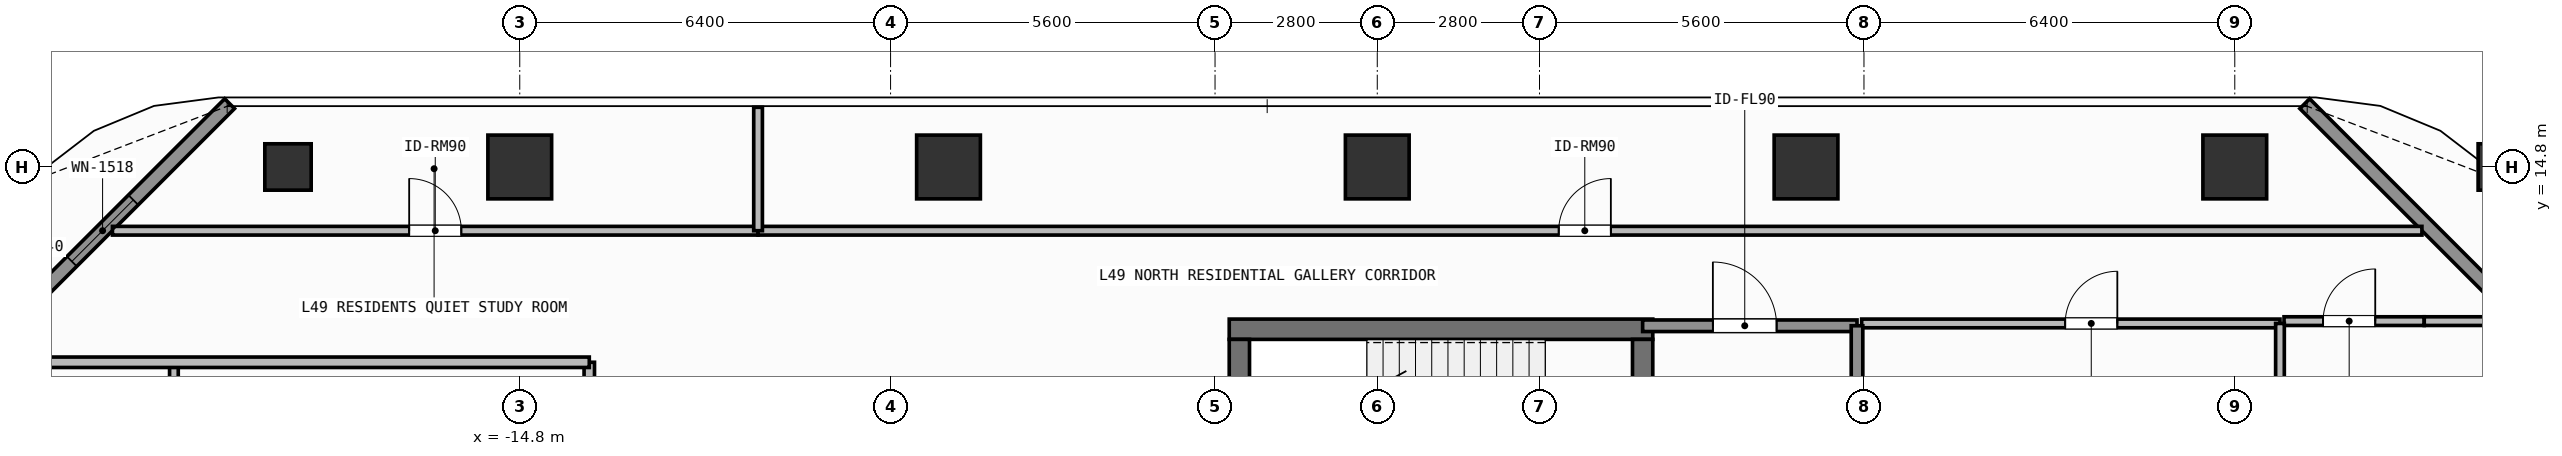
"""IFC4 building model, lengths in metres.
Left out: names, types, materials, properties, quantities, classifications, styles, units other than length and angle.
Written with IfcOpenShell. Run it as: python <this file> out.ifc"""

import sys

from ifc_helpers import new_model, si_unit, direction, frame, frame_2d, origin, origin_2d, place, context, subcontext, project, spatial, rectangle, hollow_rectangle, extrude, element, fill, save


model = new_model("IFC4")
c1 = context("Model", 3, precision=1e-05, world=origin(), true_north=direction((0.0, 1.0)))
c2 = subcontext(c1, "Body", "Model", "MODEL_VIEW")
j1 = project(units=[si_unit("LENGTHUNIT", "METRE"), si_unit("PLANEANGLEUNIT", "RADIAN")], contexts=[c1])
p1 = place(None, origin())
s1 = spatial("IfcSite", under=j1, at=p1, CompositionType="ELEMENT")
p2 = place(p1, origin())
s2 = spatial("IfcBuilding", under=s1, at=p2, CompositionType="ELEMENT")
p3 = place(p2, frame((0.0, 0.0, 199.2)))
s3 = spatial("IfcBuildingStorey", under=s2, at=p3, CompositionType="ELEMENT", Elevation=199.2)
p4 = place(p3, frame((-2.555, 12.0, 0.0), z_axis=(0.0, 0.0, 1.0), x_axis=(1.0, 0.0, 0.0)))
e1 = element("IfcWall", 1, at=p4, inside=s3, PredefinedType="SHEAR", context=c2, shape_type="SweptSolid", body=[
    extrude(rectangle(XDim=7.31, YDim=0.35, at=frame_2d((3.655, 0.0))), origin(), (0.0, 0.0, 1.0), 3.9),
])
p5 = place(p3, frame((-2.38, 8.9, 0.0), z_axis=(0.0, 0.0, 1.0), x_axis=(0.0, 1.0, 0.0)))
e2 = element("IfcWall", 2, at=p5, inside=s3, PredefinedType="SHEAR", context=c2, shape_type="SweptSolid", body=[
    extrude(rectangle(XDim=2.925, YDim=0.35, at=frame_2d((1.462, 0.0))), origin(), (0.0, 0.0, 1.0), 3.9),
])
p6 = place(p3, frame((4.58, 11.825, 0.0), z_axis=(0.0, 0.0, 1.0), x_axis=(0.0, -1.0, 0.0)))
e3 = element("IfcWall", 3, at=p6, inside=s3, PredefinedType="SHEAR", context=c2, shape_type="SweptSolid", body=[
    extrude(rectangle(XDim=2.925, YDim=0.35, at=frame_2d((1.462, 0.0))), origin(), (0.0, 0.0, 1.0), 3.9),
])
p7 = place(p6, frame((0.913, 0.0, 0.0)))
e4 = element("IfcOpeningElement", 4, at=p7, cuts=e3, PredefinedType="OPENING", context=c2, shape_type="SweptSolid", body=[
    extrude(rectangle(XDim=1.1, YDim=2.15, at=frame_2d((0.55, 1.075))), frame((0.0, 0.185, 0.0), z_axis=(0.0, -1.0, 0.0), x_axis=(1.0, 0.0, 0.0)), (0.0, 0.0, 1.0), 0.37),
])
for number, where, z_axis, x_axis in (
    (5, (-14.8, 14.8, 0.0), (0.0, 0.0, 1.0), (1.0, 0.0, 0.0)),
    (6, (-7.4, 14.8, 0.0), (0.0, 0.0, 1.0), (1.0, 0.0, 0.0)),
    (7, (0.0, 14.8, 0.0), (0.0, 0.0, 1.0), (1.0, 0.0, 0.0)),
    (8, (7.4, 14.8, 0.0), (0.0, 0.0, 1.0), (1.0, 0.0, 0.0)),
    (9, (14.8, 14.8, 0.0), (0.0, 0.0, 1.0), (1.0, 0.0, 0.0)),
):
    element("IfcColumn", number, at=place(p3, frame(where, z_axis=z_axis, x_axis=x_axis)), inside=s3, PredefinedType="COLUMN", context=c2, shape_type="SweptSolid", body=[
        extrude(rectangle(XDim=1.1, YDim=1.1, at=origin_2d()), origin(), (0.0, 0.0, 1.0), 3.9),
    ])
for number, where, z_axis, x_axis in (
    (10, (-18.8, 14.8, 0.0), (0.0, 0.0, 1.0), (1.0, 0.0, 0.0)),
    (11, (19.4, 14.8, 0.0), (0.0, 0.0, 1.0), (1.0, 0.0, 0.0)),
):
    element("IfcColumn", number, at=place(p3, frame(where, z_axis=z_axis, x_axis=x_axis)), inside=s3, PredefinedType="COLUMN", context=c2, shape_type="SweptSolid", body=[
        extrude(hollow_rectangle(XDim=0.8, YDim=0.8, WallThickness=0.036, at=origin_2d()), origin(), (0.0, 0.0, 1.0), 3.9),
    ])
p8 = place(p3, frame((-24.192, 11.508, 0.0), z_axis=(0.0, 0.0, 1.0), x_axis=(0.707106781187, 0.707106781187, 0.0)))
e12 = element("IfcWall", 12, at=p8, inside=s3, PredefinedType="SOLIDWALL", context=c2, shape_type="SweptSolid", body=[
    extrude(rectangle(XDim=6.201, YDim=0.24, at=frame_2d((3.101, 0.0))), origin(), (0.0, 0.0, 1.0), 3.68),
])
p9 = place(p8, frame((2.351, 0.0, 0.8)))
e13 = element("IfcOpeningElement", 13, at=p9, cuts=e12, PredefinedType="OPENING", context=c2, shape_type="SweptSolid", body=[
    extrude(rectangle(XDim=1.5, YDim=1.85, at=frame_2d((0.75, 0.925))), frame((0.0, 0.13, 0.0), z_axis=(0.0, -1.0, 0.0), x_axis=(1.0, 0.0, 0.0)), (0.0, 0.0, 1.0), 0.26),
])
p10 = place(p3, frame((16.008, 15.892, 0.0), z_axis=(0.0, 0.0, 1.0), x_axis=(0.707106781187, -0.707106781187, 0.0)))
e14 = element("IfcWall", 14, at=p10, inside=s3, PredefinedType="SOLIDWALL", context=c2, shape_type="SweptSolid", body=[
    extrude(rectangle(XDim=6.201, YDim=0.24, at=frame_2d((3.101, 0.0))), origin(), (0.0, 0.0, 1.0), 3.68),
])
p11 = place(p3, frame((4.58, 12.06, 0.0), z_axis=(0.0, 0.0, 1.0), x_axis=(1.0, 0.0, 0.0)))
e15 = element("IfcWall", 15, at=p11, inside=s3, PredefinedType="SOLIDWALL", context=c2, shape_type="SweptSolid", body=[
    extrude(rectangle(XDim=3.7, YDim=0.2, at=frame_2d((1.85, 0.0))), origin(), (0.0, 0.0, 1.0), 3.68),
])
p12 = place(p11, frame((1.212, 0.0, 0.0)))
e16 = element("IfcOpeningElement", 16, at=p12, cuts=e15, PredefinedType="OPENING", context=c2, shape_type="SweptSolid", body=[
    extrude(rectangle(XDim=1.1, YDim=2.15, at=frame_2d((0.55, 1.075))), frame((0.0, 0.11, 0.0), z_axis=(0.0, -1.0, 0.0), x_axis=(1.0, 0.0, 0.0)), (0.0, 0.0, 1.0), 0.22),
])
p13 = place(p3, frame((8.36, 12.1, 0.0), z_axis=(0.0, 0.0, 1.0), x_axis=(1.0, 0.0, 0.0)))
e17 = element("IfcWall", 17, at=p13, inside=s3, PredefinedType="PARTITIONING", context=c2, shape_type="SweptSolid", body=[
    extrude(rectangle(XDim=7.22, YDim=0.15, at=frame_2d((3.61, 0.0))), origin(), (0.0, 0.0, 1.0), 3.68),
])
p14 = place(p13, frame((3.513, 0.0, 0.0)))
e18 = element("IfcOpeningElement", 18, at=p14, cuts=e17, PredefinedType="OPENING", context=c2, shape_type="SweptSolid", body=[
    extrude(rectangle(XDim=0.9, YDim=2.1, at=frame_2d((0.45, 1.05))), frame((0.0, 0.085, 0.0), z_axis=(0.0, -1.0, 0.0), x_axis=(1.0, 0.0, 0.0)), (0.0, 0.0, 1.0), 0.17),
])
p15 = place(p3, frame((-21.83, 13.7, 0.0), z_axis=(0.0, 0.0, 1.0), x_axis=(1.0, 0.0, 0.0)))
e19 = element("IfcWall", 19, at=p15, inside=s3, PredefinedType="PARTITIONING", context=c2, shape_type="SweptSolid", body=[
    extrude(rectangle(XDim=11.143, YDim=0.15, at=frame_2d((5.572, 0.0))), origin(), (0.0, 0.0, 1.0), 3.68),
])
p16 = place(p15, frame((5.122, 0.0, 0.0)))
e20 = element("IfcOpeningElement", 20, at=p16, cuts=e19, PredefinedType="OPENING", context=c2, shape_type="SweptSolid", body=[
    extrude(rectangle(XDim=0.9, YDim=2.1, at=frame_2d((0.45, 1.05))), frame((0.0, 0.085, 0.0), z_axis=(0.0, -1.0, 0.0), x_axis=(1.0, 0.0, 0.0)), (0.0, 0.0, 1.0), 0.17),
])
p17 = place(p3, frame((-10.687, 13.7, 0.0), z_axis=(0.0, 0.0, 1.0), x_axis=(1.0, 0.0, 0.0)))
e21 = element("IfcWall", 21, at=p17, inside=s3, PredefinedType="PARTITIONING", context=c2, shape_type="SweptSolid", body=[
    extrude(rectangle(XDim=28.717, YDim=0.15, at=frame_2d((14.358, 0.0))), origin(), (0.0, 0.0, 1.0), 3.68),
])
p18 = place(p17, frame((13.819, 0.0, 0.0)))
e22 = element("IfcOpeningElement", 22, at=p18, cuts=e21, PredefinedType="OPENING", context=c2, shape_type="SweptSolid", body=[
    extrude(rectangle(XDim=0.9, YDim=2.1, at=frame_2d((0.45, 1.05))), frame((0.0, 0.085, 0.0), z_axis=(0.0, -1.0, 0.0), x_axis=(1.0, 0.0, 0.0)), (0.0, 0.0, 1.0), 0.17),
])
p19 = place(p3, frame((-13.6, 0.644, 0.0), z_axis=(0.0, 0.0, 1.0), x_axis=(0.0, 1.0, 0.0)))
e23 = element("IfcWall", 23, at=p19, inside=s3, PredefinedType="PARTITIONING", context=c2, shape_type="SweptSolid", body=[
    extrude(rectangle(XDim=10.786, YDim=0.18, at=frame_2d((5.393, 0.0))), origin(), (0.0, 0.0, 1.0), 3.68),
])
p20 = place(p19, frame((4.982, 0.0, 0.0)))
e24 = element("IfcOpeningElement", 24, at=p20, cuts=e23, PredefinedType="OPENING", context=c2, shape_type="SweptSolid", body=[
    extrude(rectangle(XDim=1.0, YDim=2.2, at=frame_2d((0.5, 1.1))), frame((0.0, 0.1, 0.0), z_axis=(0.0, -1.0, 0.0), x_axis=(1.0, 0.0, 0.0)), (0.0, 0.0, 1.0), 0.2),
])
p21 = place(p3, frame((15.65, 12.14, 0.0), z_axis=(0.0, 0.0, 1.0), x_axis=(1.0, 0.0, 0.0)))
e25 = element("IfcWall", 25, at=p21, inside=s3, PredefinedType="PARTITIONING", context=c2, shape_type="SweptSolid", body=[
    extrude(rectangle(XDim=2.42, YDim=0.15, at=frame_2d((1.21, 0.0))), origin(), (0.0, 0.0, 1.0), 3.68),
])
p22 = place(p21, frame((0.674, 0.0, 0.0)))
e26 = element("IfcOpeningElement", 26, at=p22, cuts=e25, PredefinedType="OPENING", context=c2, shape_type="SweptSolid", body=[
    extrude(rectangle(XDim=0.9, YDim=2.1, at=frame_2d((0.45, 1.05))), frame((0.0, 0.085, 0.0), z_axis=(0.0, -1.0, 0.0), x_axis=(1.0, 0.0, 0.0)), (0.0, 0.0, 1.0), 0.17),
])
p23 = place(p3, frame((8.28, 8.8, 0.0), z_axis=(0.0, 0.0, 1.0), x_axis=(0.0, 1.0, 0.0)))
e27 = element("IfcWall", 27, at=p23, inside=s3, PredefinedType="SOLIDWALL", context=c2, shape_type="SweptSolid", body=[
    extrude(rectangle(XDim=3.26, YDim=0.2, at=frame_2d((1.63, 0.0))), origin(), (0.0, 0.0, 1.0), 3.68),
])
p24 = place(p3, frame((15.58, 5.85, 0.0), z_axis=(0.0, 0.0, 1.0), x_axis=(0.0, 1.0, 0.0)))
e28 = element("IfcWall", 28, at=p24, inside=s3, PredefinedType="PARTITIONING", context=c2, shape_type="SweptSolid", body=[
    extrude(rectangle(XDim=6.25, YDim=0.15, at=frame_2d((3.125, 0.0))), origin(), (0.0, 0.0, 1.0), 3.68),
])
p25 = place(p3, frame((-10.687, 13.7, 0.0), z_axis=(0.0, 0.0, 1.0), x_axis=(0.0, 1.0, 0.0)))
e29 = element("IfcWall", 29, at=p25, inside=s3, PredefinedType="PARTITIONING", context=c2, shape_type="SweptSolid", body=[
    extrude(rectangle(XDim=2.13, YDim=0.15, at=frame_2d((1.065, 0.0))), origin(), (0.0, 0.0, 1.0), 3.68),
])
p26 = place(p3, frame((-20.769, 8.146, 0.0), z_axis=(0.0, 0.0, 1.0), x_axis=(0.0, 1.0, 0.0)))
e30 = element("IfcWall", 30, at=p26, inside=s3, PredefinedType="PARTITIONING", context=c2, shape_type="SweptSolid", body=[
    extrude(rectangle(XDim=3.284, YDim=0.15, at=frame_2d((1.642, 0.0))), origin(), (0.0, 0.0, 1.0), 3.68),
])
p27 = place(p3, frame((-24.13, 11.43, 0.0), z_axis=(0.0, 0.0, 1.0), x_axis=(1.0, 0.0, 0.0)))
e31 = element("IfcWall", 31, at=p27, inside=s3, PredefinedType="PARTITIONING", context=c2, shape_type="SweptSolid", body=[
    extrude(rectangle(XDim=10.53, YDim=0.18, at=frame_2d((5.265, 0.0))), origin(), (0.0, 0.0, 1.0), 3.42),
])
p28 = place(p3, frame((18.07, 12.14, 0.0), z_axis=(0.0, 0.0, 1.0), x_axis=(1.0, 0.0, 0.0)))
e32 = element("IfcWall", 32, at=p28, inside=s3, PredefinedType="PARTITIONING", context=c2, shape_type="SweptSolid", body=[
    extrude(rectangle(XDim=1.52, YDim=0.15, at=frame_2d((0.76, 0.0))), origin(), (0.0, 0.0, 1.0), 3.68),
])
p29 = place(p9, origin())
e33 = element("IfcWindow", 33, at=p29, inside=s3, PartitioningType="SINGLE_PANEL", PredefinedType="WINDOW", context=c2, shape_type="SweptSolid", body=[
    extrude(rectangle(XDim=1.5, YDim=1.85, at=frame_2d((0.75, 0.925))), frame((0.0, 0.03, 0.0), z_axis=(0.0, -1.0, 0.0), x_axis=(1.0, 0.0, 0.0)), (0.0, 0.0, 1.0), 0.06),
])
fill(e13, e33)
p30 = place(p12, origin())
e34 = element("IfcDoor", 34, at=p30, inside=s3, OperationType="SINGLE_SWING_LEFT", PredefinedType="DOOR", context=c2, shape_type="SweptSolid", body=[
    extrude(rectangle(XDim=1.1, YDim=2.15, at=frame_2d((0.55, 1.075))), frame((0.0, 0.025, 0.0), z_axis=(0.0, -1.0, 0.0), x_axis=(1.0, 0.0, 0.0)), (0.0, 0.0, 1.0), 0.05),
])
fill(e16, e34)
p31 = place(p14, origin())
e35 = element("IfcDoor", 35, at=p31, inside=s3, OperationType="SINGLE_SWING_RIGHT", PredefinedType="DOOR", context=c2, shape_type="SweptSolid", body=[
    extrude(rectangle(XDim=0.9, YDim=2.1, at=frame_2d((0.45, 1.05))), frame((0.0, 0.025, 0.0), z_axis=(0.0, -1.0, 0.0), x_axis=(1.0, 0.0, 0.0)), (0.0, 0.0, 1.0), 0.05),
])
fill(e18, e35)
p32 = place(p16, origin())
e36 = element("IfcDoor", 36, at=p32, inside=s3, OperationType="SINGLE_SWING_LEFT", PredefinedType="DOOR", context=c2, shape_type="SweptSolid", body=[
    extrude(rectangle(XDim=0.9, YDim=2.1, at=frame_2d((0.45, 1.05))), frame((0.0, 0.025, 0.0), z_axis=(0.0, -1.0, 0.0), x_axis=(1.0, 0.0, 0.0)), (0.0, 0.0, 1.0), 0.05),
])
fill(e20, e36)
p33 = place(p18, origin())
e37 = element("IfcDoor", 37, at=p33, inside=s3, OperationType="SINGLE_SWING_RIGHT", PredefinedType="DOOR", context=c2, shape_type="SweptSolid", body=[
    extrude(rectangle(XDim=0.9, YDim=2.1, at=frame_2d((0.45, 1.05))), frame((0.0, 0.025, 0.0), z_axis=(0.0, -1.0, 0.0), x_axis=(1.0, 0.0, 0.0)), (0.0, 0.0, 1.0), 0.05),
])
fill(e22, e37)
p34 = place(p22, origin())
e38 = element("IfcDoor", 38, at=p34, inside=s3, OperationType="SINGLE_SWING_RIGHT", PredefinedType="DOOR", context=c2, shape_type="SweptSolid", body=[
    extrude(rectangle(XDim=0.9, YDim=2.1, at=frame_2d((0.45, 1.05))), frame((0.0, 0.025, 0.0), z_axis=(0.0, -1.0, 0.0), x_axis=(1.0, 0.0, 0.0)), (0.0, 0.0, 1.0), 0.05),
])
fill(e26, e38)
save(model, sys.argv[1])
